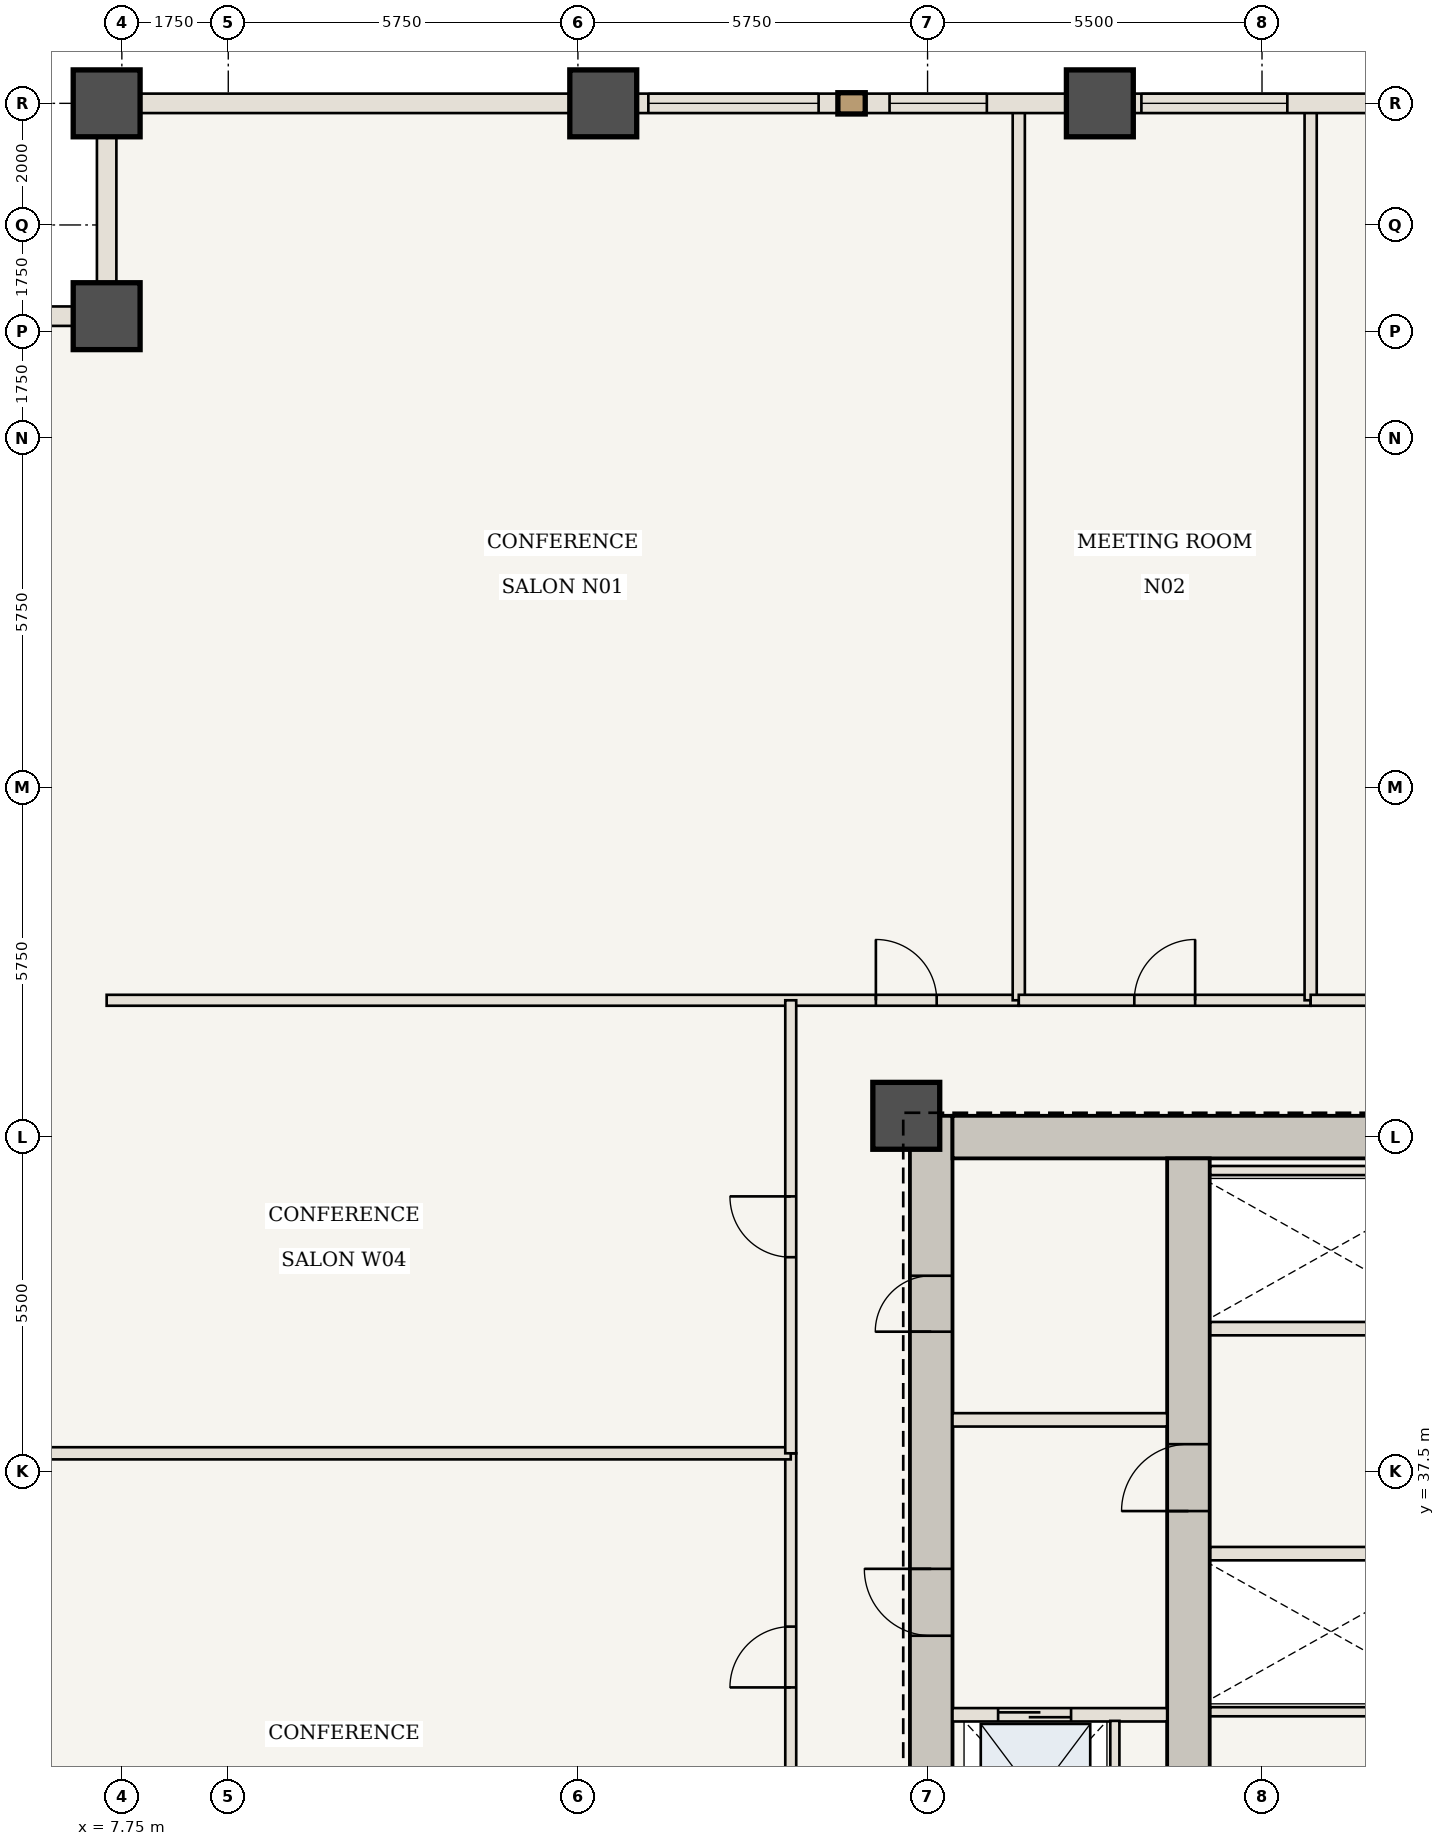
"""IFC4 building model, lengths in metres.
Left out: names, types, materials, properties, quantities, classifications, styles, units other than length and angle.
Written with IfcOpenShell. Run it as: python <this file> out.ifc"""

import sys

from ifc_helpers import new_model, si_unit, direction, frame, frame_2d, origin, origin_2d, place, context, subcontext, project, spatial, rectangle, extrude, element, fill, save


model = new_model("IFC4")
c1 = context("Model", 3, precision=1e-05, world=origin(), true_north=direction((0.0, 1.0)))
c2 = subcontext(c1, "Body", "Model", "MODEL_VIEW")
j1 = project(units=[si_unit("LENGTHUNIT", "METRE"), si_unit("PLANEANGLEUNIT", "RADIAN")], contexts=[c1])
p1 = place(None, origin())
s1 = spatial("IfcSite", under=j1, at=p1, CompositionType="ELEMENT")
p2 = place(p1, origin())
s2 = spatial("IfcBuilding", under=s1, at=p2, CompositionType="ELEMENT")
p3 = place(p2, frame((0.0, 0.0, 85.75)))
s3 = spatial("IfcBuildingStorey", under=s2, at=p3, CompositionType="ELEMENT", Elevation=85.75)
p4 = place(p3, frame((21.06, 30.6, 0.0), z_axis=(0.0, 0.0, 1.0), x_axis=(0.0, 1.0, 0.0)))
e1 = element("IfcWall", 1, at=p4, inside=s3, PredefinedType="SHEAR", context=c2, shape_type="SweptSolid", body=[
    extrude(rectangle(XDim=12.75, YDim=0.7, at=frame_2d((6.375, 0.0))), origin(), (0.0, 0.0, 1.0), 3.5),
])
p5 = place(p4, frame((4.2, 0.0, 0.0)))
e2 = element("IfcOpeningElement", 2, at=p5, cuts=e1, PredefinedType="OPENING", context=c2, shape_type="SweptSolid", body=[
    extrude(rectangle(XDim=1.1, YDim=2.15, at=frame_2d((0.55, 1.075))), frame((0.0, 0.36, 0.0), z_axis=(0.0, -1.0, 0.0), x_axis=(1.0, 0.0, 0.0)), (0.0, 0.0, 1.0), 0.72),
])
p6 = place(p4, frame((9.2, 0.0, 0.0)))
e3 = element("IfcOpeningElement", 3, at=p6, cuts=e1, PredefinedType="OPENING", context=c2, shape_type="SweptSolid", body=[
    extrude(rectangle(XDim=0.92, YDim=2.1, at=frame_2d((0.46, 1.05))), frame((0.0, 0.36, 0.0), z_axis=(0.0, -1.0, 0.0), x_axis=(1.0, 0.0, 0.0)), (0.0, 0.0, 1.0), 0.72),
])
p7 = place(p3, frame((21.41, 43.0, 0.0), z_axis=(0.0, 0.0, 1.0), x_axis=(1.0, 0.0, 0.0)))
e4 = element("IfcWall", 4, at=p7, inside=s3, PredefinedType="SHEAR", context=c2, shape_type="SweptSolid", body=[
    extrude(rectangle(XDim=8.24, YDim=0.7, at=frame_2d((4.12, 0.0))), origin(), (0.0, 0.0, 1.0), 3.5),
])
p8 = place(p3, frame((25.29, 30.6, 0.0), z_axis=(0.0, 0.0, 1.0), x_axis=(0.0, 1.0, 0.0)))
e5 = element("IfcWall", 5, at=p8, inside=s3, PredefinedType="SHEAR", context=c2, shape_type="SweptSolid", body=[
    extrude(rectangle(XDim=12.05, YDim=0.7, at=frame_2d((6.025, 0.0))), origin(), (0.0, 0.0, 1.0), 3.5),
])
p9 = place(p8, frame((6.25, 0.0, 0.0)))
e6 = element("IfcOpeningElement", 6, at=p9, cuts=e5, PredefinedType="OPENING", context=c2, shape_type="SweptSolid", body=[
    extrude(rectangle(XDim=1.1, YDim=2.15, at=frame_2d((0.55, 1.075))), frame((0.0, 0.36, 0.0), z_axis=(0.0, -1.0, 0.0), x_axis=(1.0, 0.0, 0.0)), (0.0, 0.0, 1.0), 0.72),
])
for number, where, z_axis, x_axis in (
    (7, (20.65, 43.35, 0.0), (0.0, 0.0, 1.0), (1.0, 0.0, 0.0)),
    (8, (7.5, 60.0, 0.0), (0.0, 0.0, 1.0), (1.0, 0.0, 0.0)),
    (9, (7.5, 56.5, 0.0), (0.0, 0.0, 1.0), (1.0, 0.0, 0.0)),
    (10, (15.667, 60.0, 0.0), (0.0, 0.0, 1.0), (1.0, 0.0, 0.0)),
    (11, (23.833, 60.0, 0.0), (0.0, 0.0, 1.0), (1.0, 0.0, 0.0)),
):
    element("IfcColumn", number, at=place(p3, frame(where, z_axis=z_axis, x_axis=x_axis)), inside=s3, PredefinedType="COLUMN", context=c2, shape_type="SweptSolid", body=[
        extrude(rectangle(XDim=1.1, YDim=1.1, at=origin_2d()), origin(), (0.0, 0.0, 1.0), 3.5),
    ])
p10 = place(p3, frame((21.41, 33.5, 0.0), z_axis=(0.0, 0.0, 1.0), x_axis=(1.0, 0.0, 0.0)))
e12 = element("IfcWall", 12, at=p10, inside=s3, PredefinedType="STANDARD", context=c2, shape_type="SweptSolid", body=[
    extrude(rectangle(XDim=3.53, YDim=0.22, at=frame_2d((1.765, 0.0))), origin(), (0.0, 0.0, 1.0), 3.32),
])
p11 = place(p10, frame((0.75, 0.0, 0.0)))
e13 = element("IfcOpeningElement", 13, at=p11, cuts=e12, PredefinedType="OPENING", context=c2, shape_type="SweptSolid", body=[
    extrude(rectangle(XDim=1.2, YDim=2.2, at=frame_2d((0.6, 1.1))), frame((0.0, 0.12, 0.0), z_axis=(0.0, -1.0, 0.0), x_axis=(1.0, 0.0, 0.0)), (0.0, 0.0, 1.0), 0.24),
])
p12 = place(p3, frame((24.08, 30.75, 0.0), z_axis=(0.0, 0.0, 1.0), x_axis=(0.0, 1.0, 0.0)))
e14 = element("IfcWall", 14, at=p12, inside=s3, PredefinedType="STANDARD", context=c2, shape_type="SweptSolid", body=[
    extrude(rectangle(XDim=2.65, YDim=0.15, at=frame_2d((1.325, 0.0))), origin(), (0.0, 0.0, 1.0), 3.32),
])
p13 = place(p3, frame((21.41, 38.35, 0.0), z_axis=(0.0, 0.0, 1.0), x_axis=(1.0, 0.0, 0.0)))
e15 = element("IfcWall", 15, at=p13, inside=s3, PredefinedType="STANDARD", context=c2, shape_type="SweptSolid", body=[
    extrude(rectangle(XDim=3.53, YDim=0.22, at=frame_2d((1.765, 0.0))), origin(), (0.0, 0.0, 1.0), 3.32),
])
p14 = place(p3, frame((25.65, 36.15, 0.0), z_axis=(0.0, 0.0, 1.0), x_axis=(1.0, 0.0, 0.0)))
e16 = element("IfcWall", 16, at=p14, inside=s3, PredefinedType="STANDARD", context=c2, shape_type="SweptSolid", body=[
    extrude(rectangle(XDim=4.3, YDim=0.22, at=frame_2d((2.15, 0.0))), origin(), (0.0, 0.0, 1.0), 3.32),
])
p15 = place(p3, frame((25.65, 33.55, 0.0), z_axis=(0.0, 0.0, 1.0), x_axis=(1.0, 0.0, 0.0)))
e17 = element("IfcWall", 17, at=p15, inside=s3, PredefinedType="STANDARD", context=c2, shape_type="SweptSolid", body=[
    extrude(rectangle(XDim=4.2, YDim=0.15, at=frame_2d((2.1, 0.0))), origin(), (0.0, 0.0, 1.0), 3.32),
])
p16 = place(p3, frame((25.65, 39.85, 0.0), z_axis=(0.0, 0.0, 1.0), x_axis=(1.0, 0.0, 0.0)))
e18 = element("IfcWall", 18, at=p16, inside=s3, PredefinedType="STANDARD", context=c2, shape_type="SweptSolid", body=[
    extrude(rectangle(XDim=4.3, YDim=0.22, at=frame_2d((2.15, 0.0))), origin(), (0.0, 0.0, 1.0), 3.32),
])
p17 = place(p3, frame((25.65, 42.45, 0.0), z_axis=(0.0, 0.0, 1.0), x_axis=(1.0, 0.0, 0.0)))
e19 = element("IfcWall", 19, at=p17, inside=s3, PredefinedType="STANDARD", context=c2, shape_type="SweptSolid", body=[
    extrude(rectangle(XDim=4.2, YDim=0.15, at=frame_2d((2.1, 0.0))), origin(), (0.0, 0.0, 1.0), 3.32),
])
p18 = place(p3, frame((7.5, 45.25, 0.0), z_axis=(0.0, 0.0, 1.0), x_axis=(1.0, 0.0, 0.0)))
e20 = element("IfcWall", 20, at=p18, inside=s3, PredefinedType="STANDARD", context=c2, shape_type="SweptSolid", body=[
    extrude(rectangle(XDim=15.0, YDim=0.18, at=frame_2d((7.5, 0.0))), origin(), (0.0, 0.0, 1.0), 3.32),
])
p19 = place(p18, frame((12.65, 0.0, 0.0)))
e21 = element("IfcOpeningElement", 21, at=p19, cuts=e20, PredefinedType="OPENING", context=c2, shape_type="SweptSolid", body=[
    extrude(rectangle(XDim=1.0, YDim=2.15, at=frame_2d((0.5, 1.075))), frame((0.0, 0.1, 0.0), z_axis=(0.0, -1.0, 0.0), x_axis=(1.0, 0.0, 0.0)), (0.0, 0.0, 1.0), 0.2),
])
p20 = place(p3, frame((22.5, 45.25, 0.0), z_axis=(0.0, 0.0, 1.0), x_axis=(0.0, 1.0, 0.0)))
e22 = element("IfcWall", 22, at=p20, inside=s3, PredefinedType="STANDARD", context=c2, shape_type="SweptSolid", body=[
    extrude(rectangle(XDim=14.69, YDim=0.2, at=frame_2d((7.345, 0.0))), origin(), (0.0, 0.0, 1.0), 3.32),
])
p21 = place(p3, frame((22.5, 45.25, 0.0), z_axis=(0.0, 0.0, 1.0), x_axis=(1.0, 0.0, 0.0)))
e23 = element("IfcWall", 23, at=p21, inside=s3, PredefinedType="STANDARD", context=c2, shape_type="SweptSolid", body=[
    extrude(rectangle(XDim=4.8, YDim=0.18, at=frame_2d((2.4, 0.0))), origin(), (0.0, 0.0, 1.0), 3.32),
])
p22 = place(p21, frame((1.9, 0.0, 0.0)))
e24 = element("IfcOpeningElement", 24, at=p22, cuts=e23, PredefinedType="OPENING", context=c2, shape_type="SweptSolid", body=[
    extrude(rectangle(XDim=1.0, YDim=2.15, at=frame_2d((0.5, 1.075))), frame((0.0, 0.1, 0.0), z_axis=(0.0, -1.0, 0.0), x_axis=(1.0, 0.0, 0.0)), (0.0, 0.0, 1.0), 0.2),
])
p23 = place(p3, frame((27.3, 45.25, 0.0), z_axis=(0.0, 0.0, 1.0), x_axis=(0.0, 1.0, 0.0)))
e25 = element("IfcWall", 25, at=p23, inside=s3, PredefinedType="STANDARD", context=c2, shape_type="SweptSolid", body=[
    extrude(rectangle(XDim=14.69, YDim=0.2, at=frame_2d((7.345, 0.0))), origin(), (0.0, 0.0, 1.0), 3.32),
])
p24 = place(p3, frame((27.3, 45.25, 0.0), z_axis=(0.0, 0.0, 1.0), x_axis=(1.0, 0.0, 0.0)))
e26 = element("IfcWall", 26, at=p24, inside=s3, PredefinedType="STANDARD", context=c2, shape_type="SweptSolid", body=[
    extrude(rectangle(XDim=9.5, YDim=0.18, at=frame_2d((4.75, 0.0))), origin(), (0.0, 0.0, 1.0), 3.32),
])
p25 = place(p24, frame((5.7, 0.0, 0.0)))
e27 = element("IfcOpeningElement", 27, at=p25, cuts=e26, PredefinedType="OPENING", context=c2, shape_type="SweptSolid", body=[
    extrude(rectangle(XDim=1.0, YDim=2.15, at=frame_2d((0.5, 1.075))), frame((0.0, 0.1, 0.0), z_axis=(0.0, -1.0, 0.0), x_axis=(1.0, 0.0, 0.0)), (0.0, 0.0, 1.0), 0.2),
])
p26 = place(p3, frame((18.75, 28.2, 0.0), z_axis=(0.0, 0.0, 1.0), x_axis=(0.0, 1.0, 0.0)))
e28 = element("IfcWall", 28, at=p26, inside=s3, PredefinedType="STANDARD", context=c2, shape_type="SweptSolid", body=[
    extrude(rectangle(XDim=9.6, YDim=0.18, at=frame_2d((4.8, 0.0))), origin(), (0.0, 0.0, 1.0), 3.32),
])
p27 = place(p26, frame((5.75, 0.0, 0.0)))
e29 = element("IfcOpeningElement", 29, at=p27, cuts=e28, PredefinedType="OPENING", context=c2, shape_type="SweptSolid", body=[
    extrude(rectangle(XDim=1.0, YDim=2.15, at=frame_2d((0.5, 1.075))), frame((0.0, 0.1, 0.0), z_axis=(0.0, -1.0, 0.0), x_axis=(1.0, 0.0, 0.0)), (0.0, 0.0, 1.0), 0.2),
])
p28 = place(p3, frame((4.06, 37.8, 0.0), z_axis=(0.0, 0.0, 1.0), x_axis=(1.0, 0.0, 0.0)))
e30 = element("IfcWall", 30, at=p28, inside=s3, PredefinedType="STANDARD", context=c2, shape_type="SweptSolid", body=[
    extrude(rectangle(XDim=14.69, YDim=0.2, at=frame_2d((7.345, 0.0))), origin(), (0.0, 0.0, 1.0), 3.32),
])
p29 = place(p3, frame((18.75, 37.8, 0.0), z_axis=(0.0, 0.0, 1.0), x_axis=(0.0, 1.0, 0.0)))
e31 = element("IfcWall", 31, at=p29, inside=s3, PredefinedType="STANDARD", context=c2, shape_type="SweptSolid", body=[
    extrude(rectangle(XDim=7.45, YDim=0.18, at=frame_2d((3.725, 0.0))), origin(), (0.0, 0.0, 1.0), 3.32),
])
p30 = place(p29, frame((3.225, 0.0, 0.0)))
e32 = element("IfcOpeningElement", 32, at=p30, cuts=e31, PredefinedType="OPENING", context=c2, shape_type="SweptSolid", body=[
    extrude(rectangle(XDim=1.0, YDim=2.15, at=frame_2d((0.5, 1.075))), frame((0.0, 0.1, 0.0), z_axis=(0.0, -1.0, 0.0), x_axis=(1.0, 0.0, 0.0)), (0.0, 0.0, 1.0), 0.2),
])
p31 = place(p3, frame((7.5, 60.0, 0.0), z_axis=(0.0, 0.0, 1.0), x_axis=(1.0, 0.0, 0.0)))
e33 = element("IfcWall", 33, at=p31, inside=s3, PredefinedType="USERDEFINED", context=c2, shape_type="SweptSolid", body=[
    extrude(rectangle(XDim=8.167, YDim=0.32, at=frame_2d((4.083, 0.0))), origin(), (0.0, 0.0, 1.0), 2.52),
])
p32 = place(p3, frame((15.667, 60.0, 0.0), z_axis=(0.0, 0.0, 1.0), x_axis=(1.0, 0.0, 0.0)))
e34 = element("IfcWall", 34, at=p32, inside=s3, PredefinedType="USERDEFINED", context=c2, shape_type="SweptSolid", body=[
    extrude(rectangle(XDim=8.167, YDim=0.32, at=frame_2d((4.083, 0.0))), origin(), (0.0, 0.0, 1.0), 2.52),
])
p33 = place(p32, frame((0.742, 0.0, 0.85)))
e35 = element("IfcOpeningElement", 35, at=p33, cuts=e34, PredefinedType="OPENING", context=c2, shape_type="SweptSolid", body=[
    extrude(rectangle(XDim=2.8, YDim=1.47, at=frame_2d((1.4, 0.735))), frame((0.0, 0.17, 0.0), z_axis=(0.0, -1.0, 0.0), x_axis=(1.0, 0.0, 0.0)), (0.0, 0.0, 1.0), 0.34),
])
p34 = place(p32, frame((4.708, 0.0, 0.85)))
e36 = element("IfcOpeningElement", 36, at=p34, cuts=e34, PredefinedType="OPENING", context=c2, shape_type="SweptSolid", body=[
    extrude(rectangle(XDim=1.6, YDim=1.47, at=frame_2d((0.8, 0.735))), frame((0.0, 0.17, 0.0), z_axis=(0.0, -1.0, 0.0), x_axis=(1.0, 0.0, 0.0)), (0.0, 0.0, 1.0), 0.34),
])
p35 = place(p3, frame((23.833, 60.0, 0.0), z_axis=(0.0, 0.0, 1.0), x_axis=(1.0, 0.0, 0.0)))
e37 = element("IfcWall", 37, at=p35, inside=s3, PredefinedType="USERDEFINED", context=c2, shape_type="SweptSolid", body=[
    extrude(rectangle(XDim=8.167, YDim=0.32, at=frame_2d((4.083, 0.0))), origin(), (0.0, 0.0, 1.0), 2.52),
])
p36 = place(p35, frame((0.683, 0.0, 0.85)))
e38 = element("IfcOpeningElement", 38, at=p36, cuts=e37, PredefinedType="OPENING", context=c2, shape_type="SweptSolid", body=[
    extrude(rectangle(XDim=2.4, YDim=1.47, at=frame_2d((1.2, 0.735))), frame((0.0, 0.17, 0.0), z_axis=(0.0, -1.0, 0.0), x_axis=(1.0, 0.0, 0.0)), (0.0, 0.0, 1.0), 0.34),
])
p37 = place(p35, frame((4.467, 0.0, 0.85)))
e39 = element("IfcOpeningElement", 39, at=p37, cuts=e37, PredefinedType="OPENING", context=c2, shape_type="SweptSolid", body=[
    extrude(rectangle(XDim=2.4, YDim=1.47, at=frame_2d((1.2, 0.735))), frame((0.0, 0.17, 0.0), z_axis=(0.0, -1.0, 0.0), x_axis=(1.0, 0.0, 0.0)), (0.0, 0.0, 1.0), 0.34),
])
for number, where, z_axis, x_axis in (
    (40, (7.5, 56.5, 0.0), (0.0, 0.0, 1.0), (0.0, 1.0, 0.0)),
    (41, (4.0, 56.5, 0.0), (0.0, 0.0, 1.0), (1.0, 0.0, 0.0)),
):
    element("IfcWall", number, at=place(p3, frame(where, z_axis=z_axis, x_axis=x_axis)), inside=s3, PredefinedType="USERDEFINED", context=c2, shape_type="SweptSolid", body=[
        extrude(rectangle(XDim=3.5, YDim=0.32, at=frame_2d((1.75, 0.0))), origin(), (0.0, 0.0, 1.0), 2.52),
    ])
p38 = place(p5, origin())
e42 = element("IfcDoor", 42, at=p38, inside=s3, OperationType="SINGLE_SWING_RIGHT", PredefinedType="DOOR", context=c2, shape_type="SweptSolid", body=[
    extrude(rectangle(XDim=1.1, YDim=2.15, at=frame_2d((0.55, 1.075))), frame((0.0, 0.025, 0.0), z_axis=(0.0, -1.0, 0.0), x_axis=(1.0, 0.0, 0.0)), (0.0, 0.0, 1.0), 0.05),
])
fill(e2, e42)
p39 = place(p9, origin())
e43 = element("IfcDoor", 43, at=p39, inside=s3, OperationType="SINGLE_SWING_LEFT", PredefinedType="DOOR", context=c2, shape_type="SweptSolid", body=[
    extrude(rectangle(XDim=1.1, YDim=2.15, at=frame_2d((0.55, 1.075))), frame((0.0, 0.025, 0.0), z_axis=(0.0, -1.0, 0.0), x_axis=(1.0, 0.0, 0.0)), (0.0, 0.0, 1.0), 0.05),
])
fill(e6, e43)
p40 = place(p6, origin())
e44 = element("IfcDoor", 44, at=p40, inside=s3, OperationType="SINGLE_SWING_LEFT", PredefinedType="DOOR", context=c2, shape_type="SweptSolid", body=[
    extrude(rectangle(XDim=0.92, YDim=2.1, at=frame_2d((0.46, 1.05))), frame((0.0, 0.025, 0.0), z_axis=(0.0, -1.0, 0.0), x_axis=(1.0, 0.0, 0.0)), (0.0, 0.0, 1.0), 0.05),
])
fill(e3, e44)
p41 = place(p11, origin())
e45 = element("IfcDoor", 45, at=p41, inside=s3, OperationType="DOUBLE_DOOR_SLIDING", PredefinedType="DOOR", context=c2, shape_type="SweptSolid", body=[
    extrude(rectangle(XDim=1.2, YDim=2.2, at=frame_2d((0.6, 1.1))), frame((0.0, 0.025, 0.0), z_axis=(0.0, -1.0, 0.0), x_axis=(1.0, 0.0, 0.0)), (0.0, 0.0, 1.0), 0.05),
])
fill(e13, e45)
p42 = place(p19, origin())
e46 = element("IfcDoor", 46, at=p42, inside=s3, OperationType="SINGLE_SWING_LEFT", PredefinedType="DOOR", context=c2, shape_type="SweptSolid", body=[
    extrude(rectangle(XDim=1.0, YDim=2.15, at=frame_2d((0.5, 1.075))), frame((0.0, 0.025, 0.0), z_axis=(0.0, -1.0, 0.0), x_axis=(1.0, 0.0, 0.0)), (0.0, 0.0, 1.0), 0.05),
])
fill(e21, e46)
p43 = place(p22, origin())
e47 = element("IfcDoor", 47, at=p43, inside=s3, OperationType="SINGLE_SWING_RIGHT", PredefinedType="DOOR", context=c2, shape_type="SweptSolid", body=[
    extrude(rectangle(XDim=1.0, YDim=2.15, at=frame_2d((0.5, 1.075))), frame((0.0, 0.025, 0.0), z_axis=(0.0, -1.0, 0.0), x_axis=(1.0, 0.0, 0.0)), (0.0, 0.0, 1.0), 0.05),
])
fill(e24, e47)
p44 = place(p27, origin())
e48 = element("IfcDoor", 48, at=p44, inside=s3, OperationType="SINGLE_SWING_LEFT", PredefinedType="DOOR", context=c2, shape_type="SweptSolid", body=[
    extrude(rectangle(XDim=1.0, YDim=2.15, at=frame_2d((0.5, 1.075))), frame((0.0, 0.025, 0.0), z_axis=(0.0, -1.0, 0.0), x_axis=(1.0, 0.0, 0.0)), (0.0, 0.0, 1.0), 0.05),
])
fill(e29, e48)
p45 = place(p30, origin())
e49 = element("IfcDoor", 49, at=p45, inside=s3, OperationType="SINGLE_SWING_RIGHT", PredefinedType="DOOR", context=c2, shape_type="SweptSolid", body=[
    extrude(rectangle(XDim=1.0, YDim=2.15, at=frame_2d((0.5, 1.075))), frame((0.0, 0.025, 0.0), z_axis=(0.0, -1.0, 0.0), x_axis=(1.0, 0.0, 0.0)), (0.0, 0.0, 1.0), 0.05),
])
fill(e32, e49)
p46 = place(p33, origin())
e50 = element("IfcWindow", 50, at=p46, inside=s3, PartitioningType="SINGLE_PANEL", PredefinedType="WINDOW", context=c2, shape_type="SweptSolid", body=[
    extrude(rectangle(XDim=2.8, YDim=1.47, at=frame_2d((1.4, 0.735))), frame((0.0, 0.03, 0.0), z_axis=(0.0, -1.0, 0.0), x_axis=(1.0, 0.0, 0.0)), (0.0, 0.0, 1.0), 0.06),
])
fill(e35, e50)
p47 = place(p34, origin())
e51 = element("IfcWindow", 51, at=p47, inside=s3, PartitioningType="SINGLE_PANEL", PredefinedType="WINDOW", context=c2, shape_type="SweptSolid", body=[
    extrude(rectangle(XDim=1.6, YDim=1.47, at=frame_2d((0.8, 0.735))), frame((0.0, 0.03, 0.0), z_axis=(0.0, -1.0, 0.0), x_axis=(1.0, 0.0, 0.0)), (0.0, 0.0, 1.0), 0.06),
])
fill(e36, e51)
p48 = place(p36, origin())
e52 = element("IfcWindow", 52, at=p48, inside=s3, PartitioningType="SINGLE_PANEL", PredefinedType="WINDOW", context=c2, shape_type="SweptSolid", body=[
    extrude(rectangle(XDim=2.4, YDim=1.47, at=frame_2d((1.2, 0.735))), frame((0.0, 0.03, 0.0), z_axis=(0.0, -1.0, 0.0), x_axis=(1.0, 0.0, 0.0)), (0.0, 0.0, 1.0), 0.06),
])
fill(e38, e52)
save(model, sys.argv[1])
